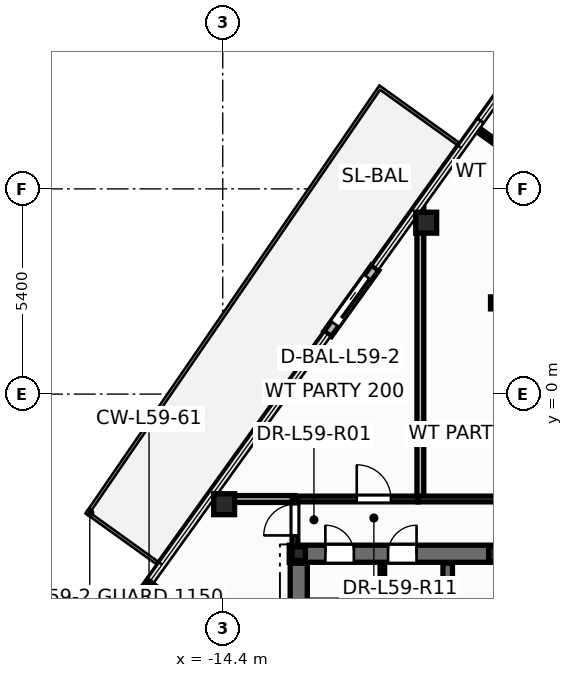
"""IFC4 building model, lengths in metres.
Left out: names, types, materials, properties, quantities, classifications, styles, units other than length and angle.
Written with IfcOpenShell. Run it as: python <this file> out.ifc"""

import sys

from ifc_helpers import new_model, si_unit, direction, frame, frame_2d, origin, origin_2d, place, context, subcontext, project, spatial, rectangle, hollow_circle, i_section, extrude, element, fill, save


model = new_model("IFC4")
c1 = context("Model", 3, precision=1e-05, world=origin(), true_north=direction((0.0, 1.0)))
c2 = subcontext(c1, "Body", "Model", "MODEL_VIEW")
j1 = project(units=[si_unit("LENGTHUNIT", "METRE"), si_unit("PLANEANGLEUNIT", "RADIAN")], contexts=[c1])
p1 = place(None, origin())
s1 = spatial("IfcSite", under=j1, at=p1, CompositionType="ELEMENT")
p2 = place(p1, origin())
s2 = spatial("IfcBuilding", under=s1, at=p2, CompositionType="ELEMENT")
p3 = place(p2, frame((0.0, 0.0, 225.3)))
s3 = spatial("IfcBuildingStorey", under=s2, at=p3, CompositionType="ELEMENT", Elevation=225.3)
for number, where, z_axis, x_axis in (
    (1, (-9.046, 4.51, 0.0), (0.0, 0.0, 1.0), (1.0, 0.0, 0.0)),
    (2, (-14.363, -2.897, 0.0), (0.0, 0.0, 1.0), (1.0, 0.0, 0.0)),
):
    element("IfcColumn", number, at=place(p3, frame(where, z_axis=z_axis, x_axis=x_axis)), inside=s3, PredefinedType="COLUMN", context=c2, shape_type="SweptSolid", body=[
        extrude(hollow_circle(Radius=0.275, WallThickness=0.024, at=origin_2d()), origin(), (0.0, 0.0, 1.0), 3.6),
    ])
p4 = place(p3, frame((-12.4, -4.2, 0.0), z_axis=(0.0, 0.0, 1.0), x_axis=(1.0, 0.0, 0.0)))
e3 = element("IfcColumn", 3, at=p4, inside=s3, PredefinedType="COLUMN", context=c2, shape_type="SweptSolid", body=[
    extrude(i_section(OverallWidth=0.352, OverallDepth=0.359, WebThickness=0.018, FlangeThickness=0.026, at=origin_2d()), origin(), (0.0, 0.0, 1.0), 3.6),
])
p5 = place(p3, frame((-7.2, -4.2, 0.0), z_axis=(0.0, 0.0, 1.0), x_axis=(1.0, 0.0, 0.0)))
e4 = element("IfcColumn", 4, at=p5, inside=s3, PredefinedType="PILASTER", context=c2, shape_type="SweptSolid", body=[
    extrude(i_section(OverallWidth=0.405, OverallDepth=0.414, WebThickness=0.022, FlangeThickness=0.032, at=origin_2d()), origin(), (0.0, 0.0, 1.0), 3.6),
])
p6 = place(p3, frame((-7.2, 2.4, 0.0), z_axis=(0.0, 0.0, 1.0), x_axis=(1.0, 0.0, 0.0)))
e5 = element("IfcColumn", 5, at=p6, inside=s3, PredefinedType="COLUMN", context=c2, shape_type="SweptSolid", body=[
    extrude(i_section(OverallWidth=0.307, OverallDepth=0.314, WebThickness=0.012, FlangeThickness=0.019, at=origin_2d()), origin(), (0.0, 0.0, 1.0), 3.6),
])
p7 = place(p3, frame((-10.39, 3.325, -0.015), z_axis=(0.0, 0.0, 1.0), x_axis=(-0.583092889468, -0.812405491274, 0.0)))
e6 = element("IfcWall", 6, at=p7, inside=s3, PredefinedType="STANDARD", context=c2, shape_type="SweptSolid", body=[
    extrude(rectangle(XDim=2.14, YDim=0.24, at=frame_2d((1.07, 0.0))), origin(), (0.0, 0.0, 1.0), 2.853),
])
p8 = place(p7, frame((0.32, 0.0, 0.015)))
e7 = element("IfcOpeningElement", 7, at=p8, cuts=e6, PredefinedType="OPENING", context=c2, shape_type="SweptSolid", body=[
    extrude(rectangle(XDim=1.506, YDim=2.204, at=frame_2d((0.75, 1.102))), frame((0.0, 0.13, 0.0), z_axis=(0.0, -1.0, 0.0), x_axis=(1.0, 0.0, 0.0)), (0.0, 0.0, 1.0), 0.26),
])
p9 = place(p3, frame((-10.2, -5.52, 0.0), z_axis=(0.0, 0.0, 1.0), x_axis=(0.0, 1.0, 0.0)))
e8 = element("IfcWall", 8, at=p9, inside=s3, PredefinedType="PARTITIONING", context=c2, shape_type="SweptSolid", body=[
    extrude(rectangle(XDim=1.12, YDim=0.12, at=frame_2d((0.56, 0.0))), origin(), (0.0, 0.0, 1.0), 3.32),
])
p10 = place(p3, frame((-12.65, -4.2, 0.0), z_axis=(0.0, 0.0, 1.0), x_axis=(1.0, 0.0, 0.0)))
e9 = element("IfcWall", 9, at=p10, inside=s3, PredefinedType="SHEAR", context=c2, shape_type="SweptSolid", body=[
    extrude(rectangle(XDim=25.3, YDim=0.45, at=frame_2d((12.65, 0.0))), origin(), (0.0, 0.0, 1.0), 3.6),
])
p11 = place(p10, frame((0.95, 0.0, 0.0)))
e10 = element("IfcOpeningElement", 10, at=p11, cuts=e9, PredefinedType="OPENING", context=c2, shape_type="SweptSolid", body=[
    extrude(rectangle(XDim=0.756, YDim=2.054, at=frame_2d((0.375, 1.027))), frame((0.0, 0.235, 0.0), z_axis=(0.0, -1.0, 0.0), x_axis=(1.0, 0.0, 0.0)), (0.0, 0.0, 1.0), 0.47),
])
p12 = place(p10, frame((2.6, 0.0, 0.0)))
e11 = element("IfcOpeningElement", 11, at=p12, cuts=e9, PredefinedType="OPENING", context=c2, shape_type="SweptSolid", body=[
    extrude(rectangle(XDim=0.756, YDim=2.054, at=frame_2d((0.375, 1.027))), frame((0.0, 0.235, 0.0), z_axis=(0.0, -1.0, 0.0), x_axis=(1.0, 0.0, 0.0)), (0.0, 0.0, 1.0), 0.47),
])
p13 = place(p10, frame((21.85, 0.0, 0.0)))
e12 = element("IfcOpeningElement", 12, at=p13, cuts=e9, PredefinedType="OPENING", context=c2, shape_type="SweptSolid", body=[
    extrude(rectangle(XDim=0.756, YDim=2.054, at=frame_2d((0.375, 1.027))), frame((0.0, 0.235, 0.0), z_axis=(0.0, -1.0, 0.0), x_axis=(1.0, 0.0, 0.0)), (0.0, 0.0, 1.0), 0.47),
])
p14 = place(p10, frame((23.5, 0.0, 0.0)))
e13 = element("IfcOpeningElement", 13, at=p14, cuts=e9, PredefinedType="OPENING", context=c2, shape_type="SweptSolid", body=[
    extrude(rectangle(XDim=0.756, YDim=2.054, at=frame_2d((0.375, 1.027))), frame((0.0, 0.235, 0.0), z_axis=(0.0, -1.0, 0.0), x_axis=(1.0, 0.0, 0.0)), (0.0, 0.0, 1.0), 0.47),
])
p15 = place(p10, frame((5.85, 0.0, 0.0)))
e14 = element("IfcOpeningElement", 14, at=p15, cuts=e9, PredefinedType="OPENING", context=c2, shape_type="SweptSolid", body=[
    extrude(rectangle(XDim=1.006, YDim=2.104, at=frame_2d((0.5, 1.052))), frame((0.0, 0.235, 0.0), z_axis=(0.0, -1.0, 0.0), x_axis=(1.0, 0.0, 0.0)), (0.0, 0.0, 1.0), 0.47),
])
p16 = place(p10, frame((10.35, 0.0, 0.0)))
e15 = element("IfcOpeningElement", 15, at=p16, cuts=e9, PredefinedType="OPENING", context=c2, shape_type="SweptSolid", body=[
    extrude(rectangle(XDim=1.406, YDim=2.154, at=frame_2d((0.7, 1.077))), frame((0.0, 0.235, 0.0), z_axis=(0.0, -1.0, 0.0), x_axis=(1.0, 0.0, 0.0)), (0.0, 0.0, 1.0), 0.47),
])
p17 = place(p10, frame((18.45, 0.0, 0.0)))
e16 = element("IfcOpeningElement", 16, at=p17, cuts=e9, PredefinedType="OPENING", context=c2, shape_type="SweptSolid", body=[
    extrude(rectangle(XDim=1.006, YDim=2.104, at=frame_2d((0.5, 1.052))), frame((0.0, 0.235, 0.0), z_axis=(0.0, -1.0, 0.0), x_axis=(1.0, 0.0, 0.0)), (0.0, 0.0, 1.0), 0.47),
])
p18 = place(p3, frame((-8.48, -13.85, 0.0), z_axis=(0.0, 0.0, 1.0), x_axis=(0.0, 1.0, 0.0)))
e17 = element("IfcWall", 17, at=p18, inside=s3, PredefinedType="SHEAR", context=c2, shape_type="SweptSolid", body=[
    extrude(rectangle(XDim=9.4, YDim=0.25, at=frame_2d((4.7, 0.0))), origin(), (0.0, 0.0, 1.0), 3.6),
])
p19 = place(p18, frame((6.95, 0.0, 0.0)))
e18 = element("IfcOpeningElement", 18, at=p19, cuts=e17, PredefinedType="OPENING", context=c2, shape_type="SweptSolid", body=[
    extrude(rectangle(XDim=1.006, YDim=2.104, at=frame_2d((0.5, 1.052))), frame((0.0, 0.135, 0.0), z_axis=(0.0, -1.0, 0.0), x_axis=(1.0, 0.0, 0.0)), (0.0, 0.0, 1.0), 0.27),
])
p20 = place(p3, frame((-12.4, -13.85, 0.0), z_axis=(0.0, 0.0, 1.0), x_axis=(0.0, 1.0, 0.0)))
e19 = element("IfcWall", 19, at=p20, inside=s3, PredefinedType="SHEAR", context=c2, shape_type="SweptSolid", body=[
    extrude(rectangle(XDim=9.4, YDim=0.45, at=frame_2d((4.7, 0.0))), origin(), (0.0, 0.0, 1.0), 3.6),
])
p21 = place(p3, frame((-9.2, -2.76, 0.0), z_axis=(0.0, 0.0, 1.0), x_axis=(0.0, 1.0, 0.0)))
e20 = element("IfcWall", 20, at=p21, inside=s3, PredefinedType="PARTITIONING", context=c2, shape_type="SweptSolid", body=[
    extrude(rectangle(XDim=7.742, YDim=0.18, at=frame_2d((3.871, 0.0))), origin(), (0.0, 0.0, 1.0), 2.595),
])
p22 = place(p3, frame((-9.26, -2.76, 0.0), z_axis=(0.0, 0.0, 1.0), x_axis=(1.0, 0.0, 0.0)))
e21 = element("IfcWall", 21, at=p22, inside=s3, PredefinedType="PARTITIONING", context=c2, shape_type="SweptSolid", body=[
    extrude(rectangle(XDim=4.82, YDim=0.15, at=frame_2d((2.41, 0.0))), origin(), (0.0, 0.0, 1.0), 2.295),
])
p23 = place(p22, frame((3.52, 0.0, 0.0)))
e22 = element("IfcOpeningElement", 22, at=p23, cuts=e21, PredefinedType="OPENING", context=c2, shape_type="SweptSolid", body=[
    extrude(rectangle(XDim=0.906, YDim=2.104, at=frame_2d((0.45, 1.052))), frame((0.0, 0.085, 0.0), z_axis=(0.0, -1.0, 0.0), x_axis=(1.0, 0.0, 0.0)), (0.0, 0.0, 1.0), 0.17),
])
p24 = place(p3, frame((-12.5, -2.76, 0.0), z_axis=(0.0, 0.0, 1.0), x_axis=(1.0, 0.0, 0.0)))
e23 = element("IfcWall", 23, at=p24, inside=s3, PredefinedType="PARTITIONING", context=c2, shape_type="SweptSolid", body=[
    extrude(rectangle(XDim=3.238, YDim=0.15, at=frame_2d((1.619, 0.0))), origin(), (0.0, 0.0, 1.0), 3.32),
])
p25 = place(p24, frame((1.626, 0.0, 0.0)))
e24 = element("IfcOpeningElement", 24, at=p25, cuts=e23, PredefinedType="OPENING", context=c2, shape_type="SweptSolid", body=[
    extrude(rectangle(XDim=0.906, YDim=2.104, at=frame_2d((0.45, 1.052))), frame((0.0, 0.085, 0.0), z_axis=(0.0, -1.0, 0.0), x_axis=(1.0, 0.0, 0.0)), (0.0, 0.0, 1.0), 0.17),
])
p26 = place(p3, frame((-15.801, -5.38, 0.0), z_axis=(0.0, 0.0, 1.0), x_axis=(-0.583201664134, -0.812327408716, 0.0)))
e25 = element("IfcWall", 25, at=p26, inside=s3, PredefinedType="PARTITIONING", context=c2, shape_type="SweptSolid", body=[
    extrude(rectangle(XDim=2.421, YDim=0.12, at=frame_2d((1.21, 0.0))), origin(), (0.0, 0.0, 1.0), 3.32),
])
p27 = place(p3, frame((-14.757, -2.76, 0.0), z_axis=(0.0, 0.0, 1.0), x_axis=(1.0, 0.0, 0.0)))
e26 = element("IfcWall", 26, at=p27, inside=s3, PredefinedType="PARTITIONING", context=c2, shape_type="SweptSolid", body=[
    extrude(rectangle(XDim=2.257, YDim=0.18, at=frame_2d((1.129, 0.0))), origin(), (0.0, 0.0, 1.0), 2.595),
])
p28 = place(p3, frame((-12.5, -4.24, 0.0), z_axis=(0.0, 0.0, 1.0), x_axis=(0.0, 1.0, 0.0)))
e27 = element("IfcWall", 27, at=p28, inside=s3, PredefinedType="PARTITIONING", context=c2, shape_type="SweptSolid", body=[
    extrude(rectangle(XDim=1.48, YDim=0.15, at=frame_2d((0.74, 0.0))), origin(), (0.0, 0.0, 1.0), 2.295),
])
p29 = place(p28, frame((0.522, 0.0, 0.0)))
e28 = element("IfcOpeningElement", 28, at=p29, cuts=e27, PredefinedType="OPENING", context=c2, shape_type="SweptSolid", body=[
    extrude(rectangle(XDim=0.826, YDim=2.104, at=frame_2d((0.41, 1.052))), frame((0.0, 0.085, 0.0), z_axis=(0.0, -1.0, 0.0), x_axis=(1.0, 0.0, 0.0)), (0.0, 0.0, 1.0), 0.17),
])
p30 = place(p3, frame((-16.345, -4.99, 0.0), z_axis=(0.0, 0.0, 1.0), x_axis=(0.812328158573, -0.583200619675, 0.0)))
e29 = element("IfcWall", 29, at=p30, inside=s3, PredefinedType="PARTITIONING", context=c2, shape_type="SweptSolid", body=[
    extrude(rectangle(XDim=0.67, YDim=0.12, at=frame_2d((0.335, 0.0))), origin(), (0.0, 0.0, 1.0), 2.838),
])
p31 = place(p3, frame((-7.197, 6.607, 0.0), z_axis=(0.0, 0.0, 1.0), x_axis=(-0.812549510699, 0.582892179277, 0.0)))
e30 = element("IfcWall", 30, at=p31, inside=s3, PredefinedType="PARTITIONING", context=c2, shape_type="SweptSolid", body=[
    extrude(rectangle(XDim=0.67, YDim=0.12, at=frame_2d((0.335, 0.0))), origin(), (0.0, 0.0, 1.0), 2.838),
])
p32 = place(p8, origin())
e31 = element("IfcDoor", 31, at=p32, inside=s3, OperationType="SLIDING_TO_RIGHT", PredefinedType="DOOR", context=c2, shape_type="SweptSolid", body=[
    extrude(rectangle(XDim=1.5, YDim=2.2, at=frame_2d((0.75, 1.1))), frame((0.0, 0.025, 0.0), z_axis=(0.0, -1.0, 0.0), x_axis=(1.0, 0.0, 0.0)), (0.0, 0.0, 1.0), 0.05),
])
fill(e7, e31)
p33 = place(p11, origin())
e32 = element("IfcDoor", 32, at=p33, inside=s3, OperationType="SINGLE_SWING_LEFT", PredefinedType="DOOR", context=c2, shape_type="SweptSolid", body=[
    extrude(rectangle(XDim=0.75, YDim=2.05, at=frame_2d((0.375, 1.025))), frame((0.0, 0.025, 0.0), z_axis=(0.0, -1.0, 0.0), x_axis=(1.0, 0.0, 0.0)), (0.0, 0.0, 1.0), 0.05),
])
fill(e10, e32)
p34 = place(p12, origin())
e33 = element("IfcDoor", 33, at=p34, inside=s3, OperationType="SINGLE_SWING_RIGHT", PredefinedType="DOOR", context=c2, shape_type="SweptSolid", body=[
    extrude(rectangle(XDim=0.75, YDim=2.05, at=frame_2d((0.375, 1.025))), frame((0.0, 0.025, 0.0), z_axis=(0.0, -1.0, 0.0), x_axis=(1.0, 0.0, 0.0)), (0.0, 0.0, 1.0), 0.05),
])
fill(e11, e33)
p35 = place(p29, origin())
e34 = element("IfcDoor", 34, at=p35, inside=s3, OperationType="SINGLE_SWING_LEFT", PredefinedType="DOOR", context=c2, shape_type="SweptSolid", body=[
    extrude(rectangle(XDim=0.82, YDim=2.1, at=frame_2d((0.41, 1.05))), frame((0.0, 0.025, 0.0), z_axis=(0.0, -1.0, 0.0), x_axis=(1.0, 0.0, 0.0)), (0.0, 0.0, 1.0), 0.05),
])
fill(e28, e34)
p36 = place(p25, origin())
e35 = element("IfcDoor", 35, at=p36, inside=s3, OperationType="SINGLE_SWING_LEFT", PredefinedType="DOOR", context=c2, shape_type="SweptSolid", body=[
    extrude(rectangle(XDim=0.9, YDim=2.1, at=frame_2d((0.45, 1.05))), frame((0.0, 0.025, 0.0), z_axis=(0.0, -1.0, 0.0), x_axis=(1.0, 0.0, 0.0)), (0.0, 0.0, 1.0), 0.05),
])
fill(e24, e35)
save(model, sys.argv[1])
